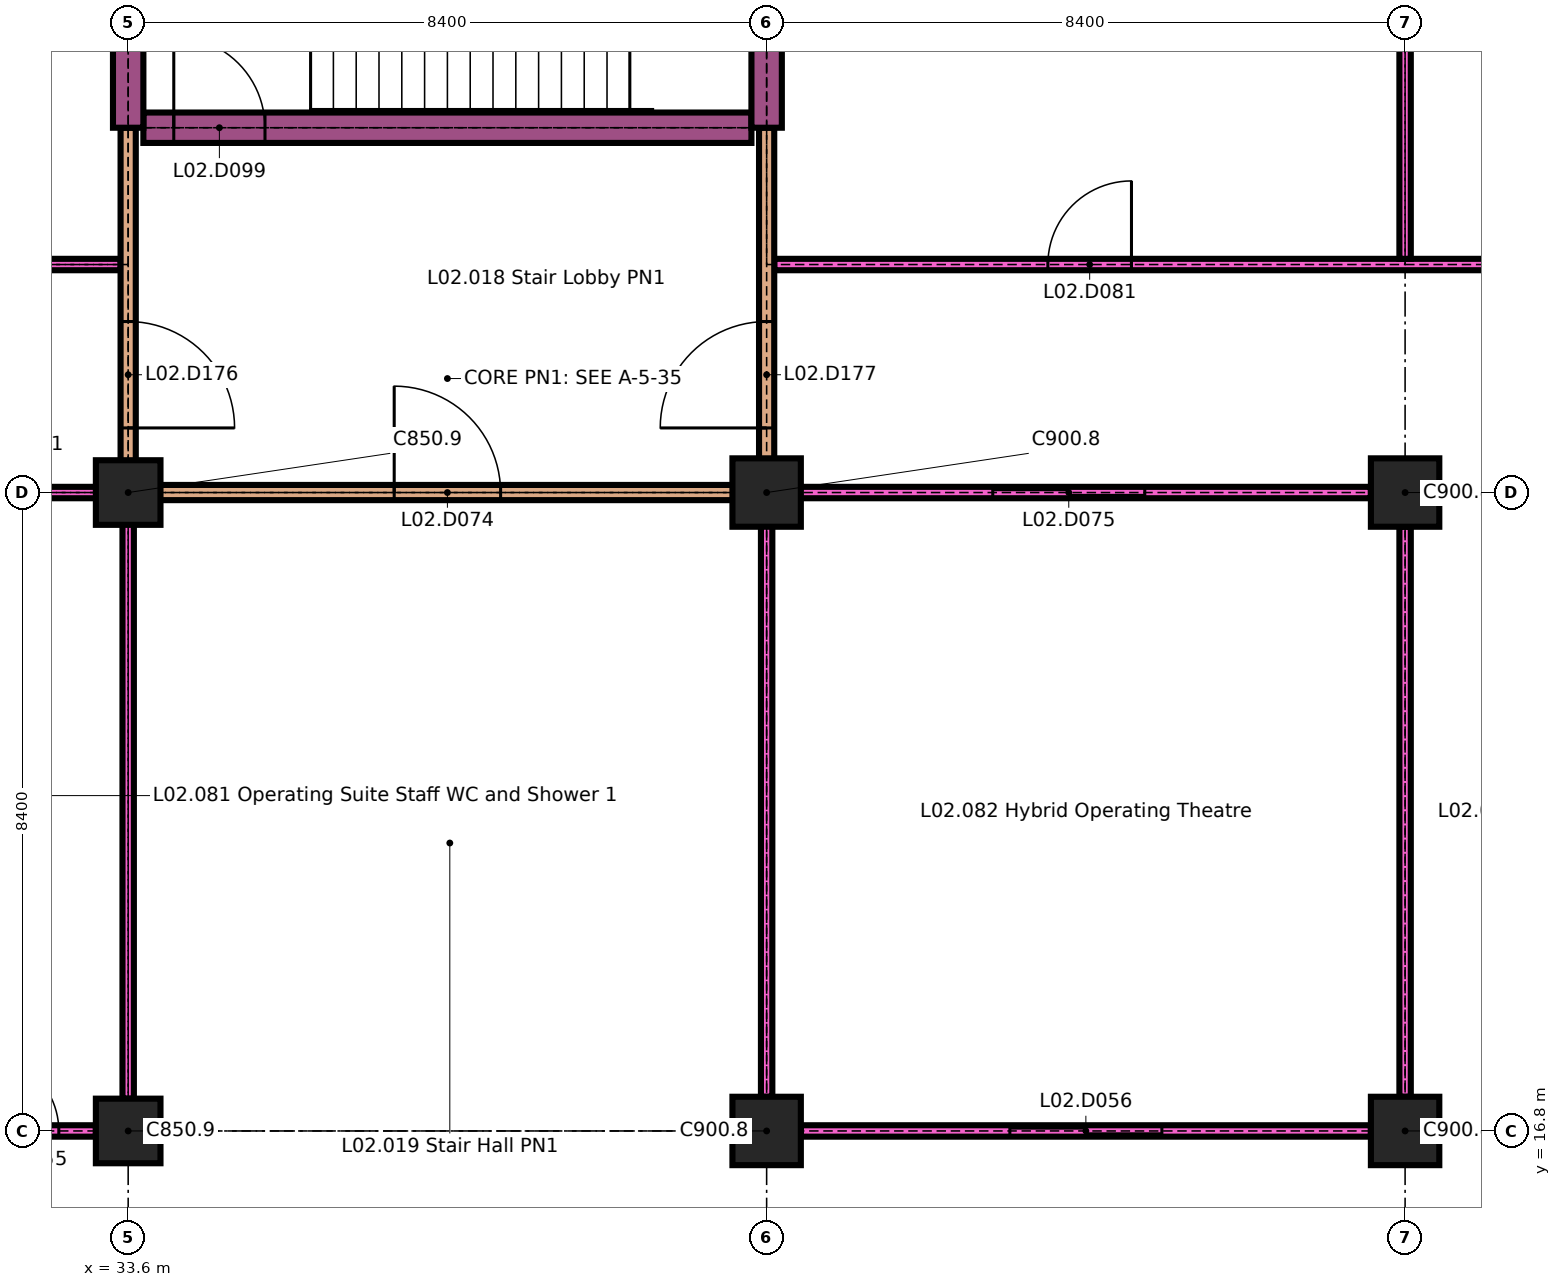
"""IFC4 building model, lengths in metres.
Left out: names, types, materials, properties, quantities, classifications, styles, units other than length and angle.
Written with IfcOpenShell. Run it as: python <this file> out.ifc"""

import sys

from ifc_helpers import new_model, si_unit, direction, frame, frame_2d, origin, origin_2d, place, context, subcontext, project, spatial, rectangle, extrude, element, fill, save


model = new_model("IFC4")
c1 = context("Model", 3, precision=1e-05, world=origin(), true_north=direction((0.0, 1.0)))
c2 = subcontext(c1, "Body", "Model", "MODEL_VIEW")
j1 = project(units=[si_unit("LENGTHUNIT", "METRE"), si_unit("PLANEANGLEUNIT", "RADIAN")], contexts=[c1])
p1 = place(None, origin())
s1 = spatial("IfcSite", under=j1, at=p1, CompositionType="ELEMENT")
p2 = place(p1, origin())
s2 = spatial("IfcBuilding", under=s1, at=p2, CompositionType="ELEMENT")
p3 = place(p2, frame((0.0, 0.0, 8.4)))
s3 = spatial("IfcBuildingStorey", under=s2, at=p3, CompositionType="ELEMENT", Elevation=8.4)
p4 = place(p3, frame((33.6, 16.8, 0.0), z_axis=(0.0, 0.0, 1.0), x_axis=(1.0, 0.0, 0.0)))
e1 = element("IfcColumn", 1, at=p4, inside=s3, PredefinedType="COLUMN", context=c2, shape_type="SweptSolid", body=[
    extrude(rectangle(XDim=0.85, YDim=0.85, at=origin_2d()), origin(), (0.0, 0.0, 1.0), 4.2),
])
for number, where, z_axis, x_axis in (
    (2, (42.0, 16.8, 0.0), (0.0, 0.0, 1.0), (1.0, 0.0, 0.0)),
    (3, (50.4, 16.8, 0.0), (0.0, 0.0, 1.0), (1.0, 0.0, 0.0)),
    (4, (50.4, 25.2, 0.0), (0.0, 0.0, 1.0), (1.0, 0.0, 0.0)),
):
    element("IfcColumn", number, at=place(p3, frame(where, z_axis=z_axis, x_axis=x_axis)), inside=s3, PredefinedType="COLUMN", context=c2, shape_type="SweptSolid", body=[
        extrude(rectangle(XDim=0.9, YDim=0.9, at=origin_2d()), origin(), (0.0, 0.0, 1.0), 4.2),
    ])
p5 = place(p3, frame((31.2, 16.8, 0.0), z_axis=(0.0, 0.0, 1.0), x_axis=(1.0, 0.0, 0.0)))
e5 = element("IfcWall", 5, at=p5, inside=s3, PredefinedType="PARTITIONING", context=c2, shape_type="SweptSolid", body=[
    extrude(rectangle(XDim=1.975, YDim=0.15, at=frame_2d((0.988, 0.0))), origin(), (0.0, 0.0, 1.0), 4.2),
])
p6 = place(p5, frame((0.488, 0.0, 0.0)))
e6 = element("IfcOpeningElement", 6, at=p6, cuts=e5, PredefinedType="OPENING", context=c2, shape_type="SweptSolid", body=[
    extrude(rectangle(XDim=1.0, YDim=2.1, at=frame_2d((0.5, 1.05))), frame((0.0, 0.085, 0.0), z_axis=(0.0, -1.0, 0.0), x_axis=(1.0, 0.0, 0.0)), (0.0, 0.0, 1.0), 0.17),
])
p7 = place(p3, frame((42.45, 16.8, 0.0), z_axis=(0.0, 0.0, 1.0), x_axis=(1.0, 0.0, 0.0)))
e7 = element("IfcWall", 7, at=p7, inside=s3, PredefinedType="PARTITIONING", context=c2, shape_type="SweptSolid", body=[
    extrude(rectangle(XDim=7.5, YDim=0.15, at=frame_2d((3.75, 0.0))), origin(), (0.0, 0.0, 1.0), 4.2),
])
p8 = place(p7, frame((2.75, 0.0, 0.0)))
e8 = element("IfcOpeningElement", 8, at=p8, cuts=e7, PredefinedType="OPENING", context=c2, shape_type="SweptSolid", body=[
    extrude(rectangle(XDim=2.0, YDim=2.4, at=frame_2d((1.0, 1.2))), frame((0.0, 0.085, 0.0), z_axis=(0.0, -1.0, 0.0), x_axis=(1.0, 0.0, 0.0)), (0.0, 0.0, 1.0), 0.17),
])
p9 = place(p3, frame((31.2, 25.2, 0.0), z_axis=(0.0, 0.0, 1.0), x_axis=(1.0, 0.0, 0.0)))
e9 = element("IfcWall", 9, at=p9, inside=s3, PredefinedType="PARTITIONING", context=c2, shape_type="SweptSolid", body=[
    extrude(rectangle(XDim=2.4, YDim=0.15, at=frame_2d((1.2, 0.0))), origin(), (0.0, 0.0, 1.0), 4.2),
])
p10 = place(p3, frame((33.6, 25.2, 0.0), z_axis=(0.0, 0.0, 1.0), x_axis=(1.0, 0.0, 0.0)))
e10 = element("IfcWall", 10, at=p10, inside=s3, PredefinedType="PARTITIONING", context=c2, shape_type="SweptSolid", body=[
    extrude(rectangle(XDim=8.4, YDim=0.2, at=frame_2d((4.2, 0.0))), origin(), (0.0, 0.0, 1.0), 4.2),
])
p11 = place(p10, frame((3.5, 0.0, 0.0)))
e11 = element("IfcOpeningElement", 11, at=p11, cuts=e10, PredefinedType="OPENING", context=c2, shape_type="SweptSolid", body=[
    extrude(rectangle(XDim=1.4, YDim=2.1, at=frame_2d((0.7, 1.05))), frame((0.0, 0.11, 0.0), z_axis=(0.0, -1.0, 0.0), x_axis=(1.0, 0.0, 0.0)), (0.0, 0.0, 1.0), 0.22),
])
p12 = place(p3, frame((42.0, 25.2, 0.0), z_axis=(0.0, 0.0, 1.0), x_axis=(1.0, 0.0, 0.0)))
e12 = element("IfcWall", 12, at=p12, inside=s3, PredefinedType="PARTITIONING", context=c2, shape_type="SweptSolid", body=[
    extrude(rectangle(XDim=7.95, YDim=0.15, at=frame_2d((3.975, 0.0))), origin(), (0.0, 0.0, 1.0), 4.2),
])
p13 = place(p12, frame((2.975, 0.0, 0.0)))
e13 = element("IfcOpeningElement", 13, at=p13, cuts=e12, PredefinedType="OPENING", context=c2, shape_type="SweptSolid", body=[
    extrude(rectangle(XDim=2.0, YDim=2.4, at=frame_2d((1.0, 1.2))), frame((0.0, 0.085, 0.0), z_axis=(0.0, -1.0, 0.0), x_axis=(1.0, 0.0, 0.0)), (0.0, 0.0, 1.0), 0.17),
])
p14 = place(p3, frame((25.325, 28.2, 0.0), z_axis=(0.0, 0.0, 1.0), x_axis=(1.0, 0.0, 0.0)))
e14 = element("IfcWall", 14, at=p14, inside=s3, PredefinedType="PARTITIONING", context=c2, shape_type="SweptSolid", body=[
    extrude(rectangle(XDim=8.175, YDim=0.15, at=frame_2d((4.087, 0.0))), origin(), (0.0, 0.0, 1.0), 4.2),
])
p15 = place(p14, frame((3.538, 0.0, 0.0)))
e15 = element("IfcOpeningElement", 15, at=p15, cuts=e14, PredefinedType="OPENING", context=c2, shape_type="SweptSolid", body=[
    extrude(rectangle(XDim=1.1, YDim=2.1, at=frame_2d((0.55, 1.05))), frame((0.0, 0.085, 0.0), z_axis=(0.0, -1.0, 0.0), x_axis=(1.0, 0.0, 0.0)), (0.0, 0.0, 1.0), 0.17),
])
p16 = place(p3, frame((42.1, 28.2, 0.0), z_axis=(0.0, 0.0, 1.0), x_axis=(1.0, 0.0, 0.0)))
e16 = element("IfcWall", 16, at=p16, inside=s3, PredefinedType="PARTITIONING", context=c2, shape_type="SweptSolid", body=[
    extrude(rectangle(XDim=41.9, YDim=0.15, at=frame_2d((20.95, 0.0))), origin(), (0.0, 0.0, 1.0), 4.2),
])
p17 = place(p16, frame((3.6, 0.0, 0.0)))
e17 = element("IfcOpeningElement", 17, at=p17, cuts=e16, PredefinedType="OPENING", context=c2, shape_type="SweptSolid", body=[
    extrude(rectangle(XDim=1.1, YDim=2.1, at=frame_2d((0.55, 1.05))), frame((0.0, 0.085, 0.0), z_axis=(0.0, -1.0, 0.0), x_axis=(1.0, 0.0, 0.0)), (0.0, 0.0, 1.0), 0.17),
])
p18 = place(p16, frame((11.95, 0.0, 0.0)))
e18 = element("IfcOpeningElement", 18, at=p18, cuts=e16, PredefinedType="OPENING", context=c2, shape_type="SweptSolid", body=[
    extrude(rectangle(XDim=1.1, YDim=2.1, at=frame_2d((0.55, 1.05))), frame((0.0, 0.085, 0.0), z_axis=(0.0, -1.0, 0.0), x_axis=(1.0, 0.0, 0.0)), (0.0, 0.0, 1.0), 0.17),
])
p19 = place(p16, frame((20.35, 0.0, 0.0)))
e19 = element("IfcOpeningElement", 19, at=p19, cuts=e16, PredefinedType="OPENING", context=c2, shape_type="SweptSolid", body=[
    extrude(rectangle(XDim=1.1, YDim=2.1, at=frame_2d((0.55, 1.05))), frame((0.0, 0.085, 0.0), z_axis=(0.0, -1.0, 0.0), x_axis=(1.0, 0.0, 0.0)), (0.0, 0.0, 1.0), 0.17),
])
p20 = place(p16, frame((28.75, 0.0, 0.0)))
e20 = element("IfcOpeningElement", 20, at=p20, cuts=e16, PredefinedType="OPENING", context=c2, shape_type="SweptSolid", body=[
    extrude(rectangle(XDim=1.1, YDim=2.1, at=frame_2d((0.55, 1.05))), frame((0.0, 0.085, 0.0), z_axis=(0.0, -1.0, 0.0), x_axis=(1.0, 0.0, 0.0)), (0.0, 0.0, 1.0), 0.17),
])
p21 = place(p16, frame((37.15, 0.0, 0.0)))
e21 = element("IfcOpeningElement", 21, at=p21, cuts=e16, PredefinedType="OPENING", context=c2, shape_type="SweptSolid", body=[
    extrude(rectangle(XDim=1.1, YDim=2.1, at=frame_2d((0.55, 1.05))), frame((0.0, 0.085, 0.0), z_axis=(0.0, -1.0, 0.0), x_axis=(1.0, 0.0, 0.0)), (0.0, 0.0, 1.0), 0.17),
])
p22 = place(p3, frame((33.8, 30.0, 0.0), z_axis=(0.0, 0.0, 1.0), x_axis=(1.0, 0.0, 0.0)))
e22 = element("IfcWall", 22, at=p22, inside=s3, PredefinedType="SHEAR", context=c2, shape_type="SweptSolid", body=[
    extrude(rectangle(XDim=8.0, YDim=0.4, at=frame_2d((4.0, 0.0))), origin(), (0.0, 0.0, 1.0), 4.2),
])
p23 = place(p22, frame((0.4, 0.0, 0.0)))
e23 = element("IfcOpeningElement", 23, at=p23, cuts=e22, PredefinedType="OPENING", context=c2, shape_type="SweptSolid", body=[
    extrude(rectangle(XDim=1.2, YDim=2.1, at=frame_2d((0.6, 1.05))), frame((0.0, 0.21, 0.0), z_axis=(0.0, -1.0, 0.0), x_axis=(1.0, 0.0, 0.0)), (0.0, 0.0, 1.0), 0.42),
])
p24 = place(p3, frame((33.6, 17.225, 0.0), z_axis=(0.0, 0.0, 1.0), x_axis=(0.0, 1.0, 0.0)))
e24 = element("IfcWall", 24, at=p24, inside=s3, PredefinedType="PARTITIONING", context=c2, shape_type="SweptSolid", body=[
    extrude(rectangle(XDim=7.875, YDim=0.15, at=frame_2d((3.938, 0.0))), origin(), (0.0, 0.0, 1.0), 4.2),
])
p25 = place(p3, frame((33.6, 25.3, 0.0), z_axis=(0.0, 0.0, 1.0), x_axis=(0.0, 1.0, 0.0)))
e25 = element("IfcWall", 25, at=p25, inside=s3, PredefinedType="PARTITIONING", context=c2, shape_type="SweptSolid", body=[
    extrude(rectangle(XDim=4.7, YDim=0.2, at=frame_2d((2.35, 0.0))), origin(), (0.0, 0.0, 1.0), 4.2),
])
p26 = place(p25, frame((0.75, 0.0, 0.0)))
e26 = element("IfcOpeningElement", 26, at=p26, cuts=e25, PredefinedType="OPENING", context=c2, shape_type="SweptSolid", body=[
    extrude(rectangle(XDim=1.4, YDim=2.1, at=frame_2d((0.7, 1.05))), frame((0.0, 0.11, 0.0), z_axis=(0.0, -1.0, 0.0), x_axis=(1.0, 0.0, 0.0)), (0.0, 0.0, 1.0), 0.22),
])
p27 = place(p3, frame((33.6, 30.0, 0.0), z_axis=(0.0, 0.0, 1.0), x_axis=(0.0, 1.0, 0.0)))
e27 = element("IfcWall", 27, at=p27, inside=s3, PredefinedType="SHEAR", context=c2, shape_type="SweptSolid", body=[
    extrude(rectangle(XDim=3.45, YDim=0.4, at=frame_2d((1.725, 0.0))), origin(), (0.0, 0.0, 1.0), 4.2),
])
p28 = place(p3, frame((42.0, 17.25, 0.0), z_axis=(0.0, 0.0, 1.0), x_axis=(0.0, 1.0, 0.0)))
e28 = element("IfcWall", 28, at=p28, inside=s3, PredefinedType="PARTITIONING", context=c2, shape_type="SweptSolid", body=[
    extrude(rectangle(XDim=7.85, YDim=0.15, at=frame_2d((3.925, 0.0))), origin(), (0.0, 0.0, 1.0), 4.2),
])
p29 = place(p3, frame((42.0, 25.3, 0.0), z_axis=(0.0, 0.0, 1.0), x_axis=(0.0, 1.0, 0.0)))
e29 = element("IfcWall", 29, at=p29, inside=s3, PredefinedType="PARTITIONING", context=c2, shape_type="SweptSolid", body=[
    extrude(rectangle(XDim=4.7, YDim=0.2, at=frame_2d((2.35, 0.0))), origin(), (0.0, 0.0, 1.0), 4.2),
])
p30 = place(p29, frame((0.75, 0.0, 0.0)))
e30 = element("IfcOpeningElement", 30, at=p30, cuts=e29, PredefinedType="OPENING", context=c2, shape_type="SweptSolid", body=[
    extrude(rectangle(XDim=1.4, YDim=2.1, at=frame_2d((0.7, 1.05))), frame((0.0, 0.11, 0.0), z_axis=(0.0, -1.0, 0.0), x_axis=(1.0, 0.0, 0.0)), (0.0, 0.0, 1.0), 0.22),
])
p31 = place(p3, frame((42.0, 30.0, 0.0), z_axis=(0.0, 0.0, 1.0), x_axis=(0.0, 1.0, 0.0)))
e31 = element("IfcWall", 31, at=p31, inside=s3, PredefinedType="SHEAR", context=c2, shape_type="SweptSolid", body=[
    extrude(rectangle(XDim=3.45, YDim=0.4, at=frame_2d((1.725, 0.0))), origin(), (0.0, 0.0, 1.0), 4.2),
])
p32 = place(p3, frame((50.4, 17.25, 0.0), z_axis=(0.0, 0.0, 1.0), x_axis=(0.0, 1.0, 0.0)))
e32 = element("IfcWall", 32, at=p32, inside=s3, PredefinedType="PARTITIONING", context=c2, shape_type="SweptSolid", body=[
    extrude(rectangle(XDim=7.5, YDim=0.15, at=frame_2d((3.75, 0.0))), origin(), (0.0, 0.0, 1.0), 4.2),
])
p33 = place(p3, frame((50.4, 28.275, 0.0), z_axis=(0.0, 0.0, 1.0), x_axis=(0.0, 1.0, 0.0)))
e33 = element("IfcWall", 33, at=p33, inside=s3, PredefinedType="PARTITIONING", context=c2, shape_type="SweptSolid", body=[
    extrude(rectangle(XDim=4.9, YDim=0.15, at=frame_2d((2.45, 0.0))), origin(), (0.0, 0.0, 1.0), 4.2),
])
p34 = place(p3, frame((33.6, 25.2, 0.0), z_axis=(0.0, 0.0, 1.0), x_axis=(1.0, 0.0, 0.0)))
e34 = element("IfcColumn", 34, at=p34, inside=s3, PredefinedType="COLUMN", context=c2, shape_type="SweptSolid", body=[
    extrude(rectangle(XDim=0.85, YDim=0.85, at=origin_2d()), origin(), (0.0, 0.0, 1.0), 4.2),
])
p35 = place(p3, frame((42.0, 25.2, 0.0), z_axis=(0.0, 0.0, 1.0), x_axis=(1.0, 0.0, 0.0)))
e35 = element("IfcColumn", 35, at=p35, inside=s3, PredefinedType="COLUMN", context=c2, shape_type="SweptSolid", body=[
    extrude(rectangle(XDim=0.9, YDim=0.9, at=origin_2d()), origin(), (0.0, 0.0, 1.0), 4.2),
])
p36 = place(p6, origin())
e36 = element("IfcDoor", 36, at=p36, inside=s3, OperationType="SINGLE_SWING_RIGHT", PredefinedType="DOOR", context=c2, shape_type="SweptSolid", body=[
    extrude(rectangle(XDim=1.0, YDim=2.1, at=frame_2d((0.5, 1.05))), frame((0.0, 0.025, 0.0), z_axis=(0.0, -1.0, 0.0), x_axis=(1.0, 0.0, 0.0)), (0.0, 0.0, 1.0), 0.05),
])
fill(e6, e36)
p37 = place(p8, origin())
e37 = element("IfcDoor", 37, at=p37, inside=s3, OperationType="DOUBLE_DOOR_SLIDING", PredefinedType="DOOR", context=c2, shape_type="SweptSolid", body=[
    extrude(rectangle(XDim=2.0, YDim=2.4, at=frame_2d((1.0, 1.2))), frame((0.0, 0.045, 0.0), z_axis=(0.0, -1.0, 0.0), x_axis=(1.0, 0.0, 0.0)), (0.0, 0.0, 1.0), 0.09),
])
fill(e8, e37)
p38 = place(p11, origin())
e38 = element("IfcDoor", 38, at=p38, inside=s3, OperationType="SINGLE_SWING_RIGHT", PredefinedType="DOOR", context=c2, shape_type="SweptSolid", body=[
    extrude(rectangle(XDim=1.4, YDim=2.1, at=frame_2d((0.7, 1.05))), frame((0.0, 0.025, 0.0), z_axis=(0.0, -1.0, 0.0), x_axis=(1.0, 0.0, 0.0)), (0.0, 0.0, 1.0), 0.05),
])
fill(e11, e38)
p39 = place(p13, origin())
e39 = element("IfcDoor", 39, at=p39, inside=s3, OperationType="DOUBLE_DOOR_SLIDING", PredefinedType="DOOR", context=c2, shape_type="SweptSolid", body=[
    extrude(rectangle(XDim=2.0, YDim=2.4, at=frame_2d((1.0, 1.2))), frame((0.0, 0.045, 0.0), z_axis=(0.0, -1.0, 0.0), x_axis=(1.0, 0.0, 0.0)), (0.0, 0.0, 1.0), 0.09),
])
fill(e13, e39)
p40 = place(p17, origin())
e40 = element("IfcDoor", 40, at=p40, inside=s3, OperationType="SINGLE_SWING_LEFT", PredefinedType="DOOR", context=c2, shape_type="SweptSolid", body=[
    extrude(rectangle(XDim=1.1, YDim=2.1, at=frame_2d((0.55, 1.05))), frame((0.0, 0.025, 0.0), z_axis=(0.0, -1.0, 0.0), x_axis=(1.0, 0.0, 0.0)), (0.0, 0.0, 1.0), 0.05),
])
fill(e17, e40)
p41 = place(p23, origin())
e41 = element("IfcDoor", 41, at=p41, inside=s3, OperationType="SINGLE_SWING_RIGHT", PredefinedType="DOOR", context=c2, shape_type="SweptSolid", body=[
    extrude(rectangle(XDim=1.2, YDim=2.1, at=frame_2d((0.6, 1.05))), frame((0.0, 0.025, 0.0), z_axis=(0.0, -1.0, 0.0), x_axis=(1.0, 0.0, 0.0)), (0.0, 0.0, 1.0), 0.05),
])
fill(e23, e41)
p42 = place(p26, origin())
e42 = element("IfcDoor", 42, at=p42, inside=s3, OperationType="SINGLE_SWING_LEFT", PredefinedType="DOOR", context=c2, shape_type="SweptSolid", body=[
    extrude(rectangle(XDim=1.4, YDim=2.1, at=frame_2d((0.7, 1.05))), frame((0.0, 0.03, 0.0), z_axis=(0.0, -1.0, 0.0), x_axis=(1.0, 0.0, 0.0)), (0.0, 0.0, 1.0), 0.06),
])
fill(e26, e42)
p43 = place(p30, origin())
e43 = element("IfcDoor", 43, at=p43, inside=s3, OperationType="SINGLE_SWING_RIGHT", PredefinedType="DOOR", context=c2, shape_type="SweptSolid", body=[
    extrude(rectangle(XDim=1.4, YDim=2.1, at=frame_2d((0.7, 1.05))), frame((0.0, 0.03, 0.0), z_axis=(0.0, -1.0, 0.0), x_axis=(1.0, 0.0, 0.0)), (0.0, 0.0, 1.0), 0.06),
])
fill(e30, e43)
save(model, sys.argv[1])
